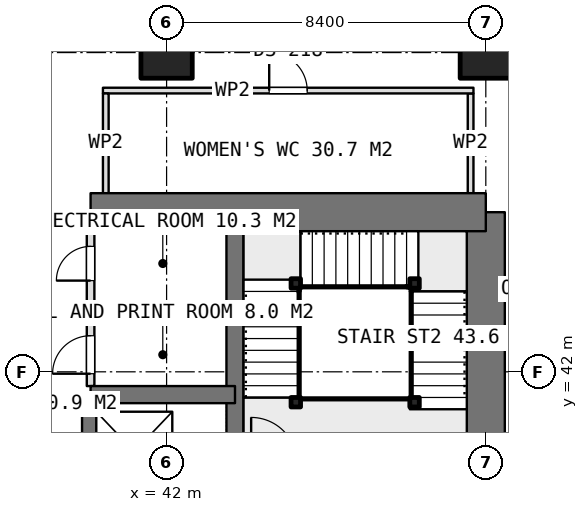
"""IFC4 building model, lengths in metres.
Left out: names, types, materials, properties, quantities, classifications, styles, units other than length and angle.
Written with IfcOpenShell. Run it as: python <this file> out.ifc"""

import sys

from ifc_helpers import new_model, si_unit, direction, frame, frame_2d, origin, origin_2d, place, context, subcontext, project, spatial, rectangle, extrude, element, fill, save


model = new_model("IFC4")
c1 = context("Model", 3, precision=1e-05, world=origin(), true_north=direction((0.0, 1.0)))
c2 = subcontext(c1, "Body", "Model", "MODEL_VIEW")
j1 = project(units=[si_unit("LENGTHUNIT", "METRE"), si_unit("PLANEANGLEUNIT", "RADIAN")], contexts=[c1])
p1 = place(None, origin())
s1 = spatial("IfcSite", under=j1, at=p1, CompositionType="ELEMENT")
p2 = place(p1, origin())
s2 = spatial("IfcBuilding", under=s1, at=p2, CompositionType="ELEMENT")
p3 = place(p2, frame((0.0, 0.0, 202.7)))
s3 = spatial("IfcBuildingStorey", under=s2, at=p3, CompositionType="ELEMENT", Elevation=202.7)
p4 = place(p3, frame((40.0, 46.2, 0.0), z_axis=(0.0, 0.0, 1.0), x_axis=(1.0, 0.0, 0.0)))
e1 = element("IfcWall", 1, at=p4, inside=s3, PredefinedType="SHEAR", context=c2, shape_type="SweptSolid", body=[
    extrude(rectangle(XDim=10.4, YDim=1.0, at=frame_2d((5.2, 0.0))), origin(), (0.0, 0.0, 1.0), 3.75),
])
p5 = place(p3, frame((50.4, 21.0, 0.0), z_axis=(0.0, 0.0, 1.0), x_axis=(0.0, 1.0, 0.0)))
e2 = element("IfcWall", 2, at=p5, inside=s3, PredefinedType="SHEAR", context=c2, shape_type="SweptSolid", body=[
    extrude(rectangle(XDim=25.2, YDim=1.0, at=frame_2d((12.6, 0.0))), origin(), (0.0, 0.0, 1.0), 3.75),
])
p6 = place(p5, frame((16.2, 0.0, 0.0)))
e3 = element("IfcOpeningElement", 3, at=p6, cuts=e2, PredefinedType="OPENING", context=c2, shape_type="SweptSolid", body=[
    extrude(rectangle(XDim=1.2, YDim=2.1, at=frame_2d((0.6, 1.05))), frame((0.0, 0.51, 0.0), z_axis=(0.0, -1.0, 0.0), x_axis=(1.0, 0.0, 0.0)), (0.0, 0.0, 1.0), 1.02),
])
p7 = place(p5, frame((10.05, 0.0, 0.0)))
e4 = element("IfcOpeningElement", 4, at=p7, cuts=e2, PredefinedType="OPENING", context=c2, shape_type="SweptSolid", body=[
    extrude(rectangle(XDim=0.9, YDim=2.1, at=frame_2d((0.45, 1.05))), frame((0.0, 0.51, 0.0), z_axis=(0.0, -1.0, 0.0), x_axis=(1.0, 0.0, 0.0)), (0.0, 0.0, 1.0), 1.02),
])
p8 = place(p5, frame((7.45, 0.0, 0.0)))
e5 = element("IfcOpeningElement", 5, at=p8, cuts=e2, PredefinedType="OPENING", context=c2, shape_type="SweptSolid", body=[
    extrude(rectangle(XDim=0.9, YDim=2.1, at=frame_2d((0.45, 1.05))), frame((0.0, 0.51, 0.0), z_axis=(0.0, -1.0, 0.0), x_axis=(1.0, 0.0, 0.0)), (0.0, 0.0, 1.0), 1.02),
])
p9 = place(p5, frame((0.7, 0.0, 0.0)))
e6 = element("IfcOpeningElement", 6, at=p9, cuts=e2, PredefinedType="OPENING", context=c2, shape_type="SweptSolid", body=[
    extrude(rectangle(XDim=1.2, YDim=2.1, at=frame_2d((0.6, 1.05))), frame((0.0, 0.51, 0.0), z_axis=(0.0, -1.0, 0.0), x_axis=(1.0, 0.0, 0.0)), (0.0, 0.0, 1.0), 1.02),
])
p10 = place(p3, frame((43.8, 21.0, 0.0), z_axis=(0.0, 0.0, 1.0), x_axis=(0.0, 1.0, 0.0)))
e7 = element("IfcWall", 7, at=p10, inside=s3, PredefinedType="SHEAR", context=c2, shape_type="SweptSolid", body=[
    extrude(rectangle(XDim=25.2, YDim=0.45, at=frame_2d((12.6, 0.0))), origin(), (0.0, 0.0, 1.0), 3.75),
])
p11 = place(p3, frame((40.0, 23.4, 0.0), z_axis=(0.0, 0.0, 1.0), x_axis=(0.0, 1.0, 0.0)))
e8 = element("IfcWall", 8, at=p11, inside=s3, PredefinedType="SHEAR", context=c2, shape_type="SweptSolid", body=[
    extrude(rectangle(XDim=18.0, YDim=0.45, at=frame_2d((9.0, 0.0))), origin(), (0.0, 0.0, 1.0), 3.75),
])
p12 = place(p11, frame((1.9, 0.0, 0.0)))
e9 = element("IfcOpeningElement", 9, at=p12, cuts=e8, PredefinedType="OPENING", context=c2, shape_type="SweptSolid", body=[
    extrude(rectangle(XDim=1.0, YDim=2.1, at=frame_2d((0.5, 1.05))), frame((0.0, 0.235, 0.0), z_axis=(0.0, -1.0, 0.0), x_axis=(1.0, 0.0, 0.0)), (0.0, 0.0, 1.0), 0.47),
])
p13 = place(p11, frame((7.95, 0.0, 0.0)))
e10 = element("IfcOpeningElement", 10, at=p13, cuts=e8, PredefinedType="OPENING", context=c2, shape_type="SweptSolid", body=[
    extrude(rectangle(XDim=0.9, YDim=2.1, at=frame_2d((0.45, 1.05))), frame((0.0, 0.235, 0.0), z_axis=(0.0, -1.0, 0.0), x_axis=(1.0, 0.0, 0.0)), (0.0, 0.0, 1.0), 0.47),
])
p14 = place(p3, frame((40.0, 41.4, 0.0), z_axis=(0.0, 0.0, 1.0), x_axis=(1.0, 0.0, 0.0)))
e11 = element("IfcWall", 11, at=p14, inside=s3, PredefinedType="SHEAR", context=c2, shape_type="SweptSolid", body=[
    extrude(rectangle(XDim=3.8, YDim=0.45, at=frame_2d((1.9, 0.0))), origin(), (0.0, 0.0, 1.0), 3.75),
])
for number, where, z_axis, x_axis in (
    (12, (42.0, 50.4, 0.0), (0.0, 0.0, 1.0), (1.0, 0.0, 0.0)),
    (13, (50.4, 50.4, 0.0), (0.0, 0.0, 1.0), (1.0, 0.0, 0.0)),
):
    element("IfcColumn", number, at=place(p3, frame(where, z_axis=z_axis, x_axis=x_axis)), inside=s3, PredefinedType="COLUMN", context=c2, shape_type="SweptSolid", body=[
        extrude(rectangle(XDim=1.35, YDim=1.35, at=origin_2d()), origin(), (0.0, 0.0, 1.0), 3.75),
    ])
p15 = place(p3, frame((40.0, 41.625, 0.0), z_axis=(0.0, 0.0, 1.0), x_axis=(0.0, 1.0, 0.0)))
e14 = element("IfcWall", 14, at=p15, inside=s3, PredefinedType="PARTITIONING", context=c2, shape_type="SweptSolid", body=[
    extrude(rectangle(XDim=4.075, YDim=0.2, at=frame_2d((2.038, 0.0))), origin(), (0.0, 0.0, 1.0), 3.5),
])
p16 = place(p15, frame((2.775, 0.0, 0.0)))
e15 = element("IfcOpeningElement", 15, at=p16, cuts=e14, PredefinedType="OPENING", context=c2, shape_type="SweptSolid", body=[
    extrude(rectangle(XDim=0.9, YDim=2.1, at=frame_2d((0.45, 1.05))), frame((0.0, 0.11, 0.0), z_axis=(0.0, -1.0, 0.0), x_axis=(1.0, 0.0, 0.0)), (0.0, 0.0, 1.0), 0.22),
])
p17 = place(p15, frame((0.325, 0.0, 0.0)))
e16 = element("IfcOpeningElement", 16, at=p17, cuts=e14, PredefinedType="OPENING", context=c2, shape_type="SweptSolid", body=[
    extrude(rectangle(XDim=1.0, YDim=2.1, at=frame_2d((0.5, 1.05))), frame((0.0, 0.11, 0.0), z_axis=(0.0, -1.0, 0.0), x_axis=(1.0, 0.0, 0.0)), (0.0, 0.0, 1.0), 0.22),
])
p18 = place(p3, frame((40.0, 43.5, 0.0), z_axis=(0.0, 0.0, 1.0), x_axis=(1.0, 0.0, 0.0)))
e17 = element("IfcWall", 17, at=p18, inside=s3, PredefinedType="PARTITIONING", context=c2, shape_type="SweptSolid", body=[
    extrude(rectangle(XDim=3.575, YDim=0.2, at=frame_2d((1.788, 0.0))), origin(), (0.0, 0.0, 1.0), 3.5),
])
p19 = place(p3, frame((40.325, 49.4, 0.0), z_axis=(0.0, 0.0, 1.0), x_axis=(1.0, 0.0, 0.0)))
e18 = element("IfcWall", 18, at=p19, inside=s3, PredefinedType="PARTITIONING", context=c2, shape_type="SweptSolid", body=[
    extrude(rectangle(XDim=9.75, YDim=0.15, at=frame_2d((4.875, 0.0))), origin(), (0.0, 0.0, 1.0), 3.5),
])
p20 = place(p19, frame((4.375, 0.0, 0.0)))
e19 = element("IfcOpeningElement", 19, at=p20, cuts=e18, PredefinedType="OPENING", context=c2, shape_type="SweptSolid", body=[
    extrude(rectangle(XDim=1.0, YDim=2.1, at=frame_2d((0.5, 1.05))), frame((0.0, 0.085, 0.0), z_axis=(0.0, -1.0, 0.0), x_axis=(1.0, 0.0, 0.0)), (0.0, 0.0, 1.0), 0.17),
])
for number, where, z_axis, x_axis in (
    (20, (40.4, 46.7, 0.0), (0.0, 0.0, 1.0), (0.0, 1.0, 0.0)),
    (21, (50.0, 46.7, 0.0), (0.0, 0.0, 1.0), (0.0, 1.0, 0.0)),
):
    element("IfcWall", number, at=place(p3, frame(where, z_axis=z_axis, x_axis=x_axis)), inside=s3, PredefinedType="PARTITIONING", context=c2, shape_type="SweptSolid", body=[
        extrude(rectangle(XDim=2.625, YDim=0.15, at=frame_2d((1.312, 0.0))), origin(), (0.0, 0.0, 1.0), 3.5),
    ])
for number, where, z_axis, x_axis in (
    (22, (45.4, 41.2, 0.0), (0.0, 0.0, 1.0), (1.0, 0.0, 0.0)),
    (23, (45.4, 44.325, 0.0), (0.0, 0.0, 1.0), (1.0, 0.0, 0.0)),
    (24, (48.525, 44.325, 0.0), (0.0, 0.0, 1.0), (1.0, 0.0, 0.0)),
    (25, (48.525, 41.2, 0.0), (0.0, 0.0, 1.0), (1.0, 0.0, 0.0)),
):
    element("IfcColumn", number, at=place(p3, frame(where, z_axis=z_axis, x_axis=x_axis)), inside=s3, PredefinedType="COLUMN", context=c2, shape_type="SweptSolid", body=[
        extrude(rectangle(XDim=0.25, YDim=0.25, at=origin_2d()), origin(), (0.0, 0.0, 1.0), 3.75),
    ])
p21 = place(p16, origin())
e26 = element("IfcDoor", 26, at=p21, inside=s3, OperationType="SINGLE_SWING_LEFT", PredefinedType="DOOR", context=c2, shape_type="SweptSolid", body=[
    extrude(rectangle(XDim=0.9, YDim=2.1, at=frame_2d((0.45, 1.05))), frame((0.0, 0.025, 0.0), z_axis=(0.0, -1.0, 0.0), x_axis=(1.0, 0.0, 0.0)), (0.0, 0.0, 1.0), 0.05),
])
fill(e15, e26)
p22 = place(p17, origin())
e27 = element("IfcDoor", 27, at=p22, inside=s3, OperationType="SINGLE_SWING_LEFT", PredefinedType="DOOR", context=c2, shape_type="SweptSolid", body=[
    extrude(rectangle(XDim=1.0, YDim=2.1, at=frame_2d((0.5, 1.05))), frame((0.0, 0.025, 0.0), z_axis=(0.0, -1.0, 0.0), x_axis=(1.0, 0.0, 0.0)), (0.0, 0.0, 1.0), 0.05),
])
fill(e16, e27)
p23 = place(p20, origin())
e28 = element("IfcDoor", 28, at=p23, inside=s3, OperationType="SINGLE_SWING_LEFT", PredefinedType="DOOR", context=c2, shape_type="SweptSolid", body=[
    extrude(rectangle(XDim=1.0, YDim=2.1, at=frame_2d((0.5, 1.05))), frame((0.0, 0.025, 0.0), z_axis=(0.0, -1.0, 0.0), x_axis=(1.0, 0.0, 0.0)), (0.0, 0.0, 1.0), 0.05),
])
fill(e19, e28)
save(model, sys.argv[1])
